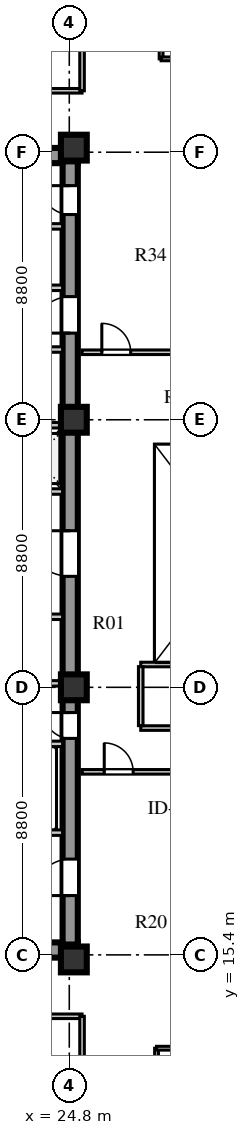
"""IFC4 building model, lengths in metres.
Left out: names, types, materials, properties, quantities, classifications, styles, units other than length and angle.
Written with IfcOpenShell. Run it as: python <this file> out.ifc"""

import sys

from ifc_helpers import new_model, si_unit, direction, frame, frame_2d, origin, origin_2d, place, context, subcontext, project, spatial, rectangle, extrude, element, fill, save


model = new_model("IFC4")
c1 = context("Model", 3, precision=1e-05, world=origin(), true_north=direction((0.0, 1.0)))
c2 = subcontext(c1, "Body", "Model", "MODEL_VIEW")
j1 = project(units=[si_unit("LENGTHUNIT", "METRE"), si_unit("PLANEANGLEUNIT", "RADIAN")], contexts=[c1])
p1 = place(None, origin())
s1 = spatial("IfcSite", under=j1, at=p1, CompositionType="ELEMENT")
p2 = place(p1, origin())
s2 = spatial("IfcBuilding", under=s1, at=p2, CompositionType="ELEMENT")
p3 = place(p2, frame((0.0, 0.0, 134.8)))
s3 = spatial("IfcBuildingStorey", under=s2, at=p3, CompositionType="ELEMENT", Elevation=134.8)
for number, where, z_axis, x_axis in (
    (1, (15.4, 15.56, 0.0), (0.0, 0.0, 1.0), (1.0, 0.0, 0.0)),
    (2, (15.4, 41.69, 0.0), (0.0, 0.0, 1.0), (1.0, 0.0, 0.0)),
):
    element("IfcWall", number, at=place(p3, frame(where, z_axis=z_axis, x_axis=x_axis)), inside=s3, PredefinedType="SHEAR", context=c2, shape_type="SweptSolid", body=[
        extrude(rectangle(XDim=9.68, YDim=0.5, at=frame_2d((4.84, 0.0))), origin(), (0.0, 0.0, 1.0), 3.6),
    ])
p4 = place(p3, frame((24.83, 15.74, 0.0), z_axis=(0.0, 0.0, 1.0), x_axis=(0.0, 1.0, 0.0)))
e3 = element("IfcWall", 3, at=p4, inside=s3, PredefinedType="SHEAR", context=c2, shape_type="SweptSolid", body=[
    extrude(rectangle(XDim=25.76, YDim=0.5, at=frame_2d((12.88, 0.0))), origin(), (0.0, 0.0, 1.0), 3.6),
])
p5 = place(p4, frame((1.61, 0.0, 0.0)))
e4 = element("IfcOpeningElement", 4, at=p5, cuts=e3, PredefinedType="OPENING", context=c2, shape_type="SweptSolid", body=[
    extrude(rectangle(XDim=1.2, YDim=2.1, at=frame_2d((0.6, 1.05))), frame((0.0, 0.26, 0.0), z_axis=(0.0, -1.0, 0.0), x_axis=(1.0, 0.0, 0.0)), (0.0, 0.0, 1.0), 0.52),
])
p6 = place(p4, frame((6.78, 0.0, 0.0)))
e5 = element("IfcOpeningElement", 5, at=p6, cuts=e3, PredefinedType="OPENING", context=c2, shape_type="SweptSolid", body=[
    extrude(rectangle(XDim=0.85, YDim=2.06, at=frame_2d((0.425, 1.03))), frame((0.0, 0.26, 0.0), z_axis=(0.0, -1.0, 0.0), x_axis=(1.0, 0.0, 0.0)), (0.0, 0.0, 1.0), 0.52),
])
p7 = place(p4, frame((12.11, 0.0, 0.0)))
e6 = element("IfcOpeningElement", 6, at=p7, cuts=e3, PredefinedType="OPENING", context=c2, shape_type="SweptSolid", body=[
    extrude(rectangle(XDim=1.5, YDim=2.12, at=frame_2d((0.75, 1.06))), frame((0.0, 0.26, 0.0), z_axis=(0.0, -1.0, 0.0), x_axis=(1.0, 0.0, 0.0)), (0.0, 0.0, 1.0), 0.52),
])
p8 = place(p4, frame((20.11, 0.0, 0.0)))
e7 = element("IfcOpeningElement", 7, at=p8, cuts=e3, PredefinedType="OPENING", context=c2, shape_type="SweptSolid", body=[
    extrude(rectangle(XDim=1.2, YDim=2.12, at=frame_2d((0.6, 1.06))), frame((0.0, 0.26, 0.0), z_axis=(0.0, -1.0, 0.0), x_axis=(1.0, 0.0, 0.0)), (0.0, 0.0, 1.0), 0.52),
])
p9 = place(p4, frame((24.01, 0.0, 0.0)))
e8 = element("IfcOpeningElement", 8, at=p9, cuts=e3, PredefinedType="OPENING", context=c2, shape_type="SweptSolid", body=[
    extrude(rectangle(XDim=0.95, YDim=2.1, at=frame_2d((0.475, 1.05))), frame((0.0, 0.26, 0.0), z_axis=(0.0, -1.0, 0.0), x_axis=(1.0, 0.0, 0.0)), (0.0, 0.0, 1.0), 0.52),
])
for number, where, z_axis, x_axis in (
    (9, (24.95, 15.25, 0.0), (0.0, 0.0, 1.0), (1.0, 0.0, 0.0)),
    (10, (24.95, 24.2, 0.0), (0.0, 0.0, 1.0), (1.0, 0.0, 0.0)),
    (11, (24.95, 33.0, 0.0), (0.0, 0.0, 1.0), (1.0, 0.0, 0.0)),
    (12, (24.95, 41.95, 0.0), (0.0, 0.0, 1.0), (1.0, 0.0, 0.0)),
):
    element("IfcColumn", number, at=place(p3, frame(where, z_axis=z_axis, x_axis=x_axis)), inside=s3, PredefinedType="COLUMN", context=c2, shape_type="SweptSolid", body=[
        extrude(rectangle(XDim=0.85, YDim=0.85, at=origin_2d()), origin(), (0.0, 0.0, 1.0), 3.6),
    ])
p10 = place(p3, frame((19.64, 19.42, 0.0), z_axis=(0.0, 0.0, 1.0), x_axis=(1.0, 0.0, 0.0)))
e13 = element("IfcWall", 13, at=p10, inside=s3, PredefinedType="SOLIDWALL", context=c2, shape_type="SweptSolid", body=[
    extrude(rectangle(XDim=4.94, YDim=0.18, at=frame_2d((2.47, 0.0))), origin(), (0.0, 0.0, 1.0), 3.6),
])
p11 = place(p10, frame((0.72, 0.0, 0.0)))
e14 = element("IfcOpeningElement", 14, at=p11, cuts=e13, PredefinedType="OPENING", context=c2, shape_type="SweptSolid", body=[
    extrude(rectangle(XDim=1.1, YDim=2.1, at=frame_2d((0.55, 1.05))), frame((0.0, 0.1, 0.0), z_axis=(0.0, -1.0, 0.0), x_axis=(1.0, 0.0, 0.0)), (0.0, 0.0, 1.0), 0.2),
])
p12 = place(p10, frame((3.02, 0.0, 0.0)))
e15 = element("IfcOpeningElement", 15, at=p12, cuts=e13, PredefinedType="OPENING", context=c2, shape_type="SweptSolid", body=[
    extrude(rectangle(XDim=1.1, YDim=2.1, at=frame_2d((0.55, 1.05))), frame((0.0, 0.1, 0.0), z_axis=(0.0, -1.0, 0.0), x_axis=(1.0, 0.0, 0.0)), (0.0, 0.0, 1.0), 0.2),
])
p13 = place(p3, frame((19.64, 22.34, 0.0), z_axis=(0.0, 0.0, 1.0), x_axis=(1.0, 0.0, 0.0)))
e16 = element("IfcWall", 16, at=p13, inside=s3, PredefinedType="SOLIDWALL", context=c2, shape_type="SweptSolid", body=[
    extrude(rectangle(XDim=4.94, YDim=0.18, at=frame_2d((2.47, 0.0))), origin(), (0.0, 0.0, 1.0), 3.6),
])
p14 = place(p3, frame((15.9, 26.52, 0.0), z_axis=(0.0, 0.0, 1.0), x_axis=(1.0, 0.0, 0.0)))
e17 = element("IfcWall", 17, at=p14, inside=s3, PredefinedType="SOLIDWALL", context=c2, shape_type="SweptSolid", body=[
    extrude(rectangle(XDim=8.68, YDim=0.18, at=frame_2d((4.34, 0.0))), origin(), (0.0, 0.0, 1.0), 3.6),
])
p15 = place(p14, frame((2.05, 0.0, 0.0)))
e18 = element("IfcOpeningElement", 18, at=p15, cuts=e17, PredefinedType="OPENING", context=c2, shape_type="SweptSolid", body=[
    extrude(rectangle(XDim=0.85, YDim=2.06, at=frame_2d((0.425, 1.03))), frame((0.0, 0.1, 0.0), z_axis=(0.0, -1.0, 0.0), x_axis=(1.0, 0.0, 0.0)), (0.0, 0.0, 1.0), 0.2),
])
p16 = place(p14, frame((5.2, 0.0, 0.0)))
e19 = element("IfcOpeningElement", 19, at=p16, cuts=e17, PredefinedType="OPENING", context=c2, shape_type="SweptSolid", body=[
    extrude(rectangle(XDim=0.95, YDim=2.1, at=frame_2d((0.475, 1.05))), frame((0.0, 0.1, 0.0), z_axis=(0.0, -1.0, 0.0), x_axis=(1.0, 0.0, 0.0)), (0.0, 0.0, 1.0), 0.2),
])
p17 = place(p3, frame((15.9, 24.33, 0.0), z_axis=(0.0, 0.0, 1.0), x_axis=(1.0, 0.0, 0.0)))
e20 = element("IfcWall", 20, at=p17, inside=s3, PredefinedType="SOLIDWALL", context=c2, shape_type="SweptSolid", body=[
    extrude(rectangle(XDim=8.68, YDim=0.18, at=frame_2d((4.34, 0.0))), origin(), (0.0, 0.0, 1.0), 2.95),
])
p18 = place(p3, frame((15.9, 30.64, 0.0), z_axis=(0.0, 0.0, 1.0), x_axis=(1.0, 0.0, 0.0)))
e21 = element("IfcWall", 21, at=p18, inside=s3, PredefinedType="SOLIDWALL", context=c2, shape_type="SweptSolid", body=[
    extrude(rectangle(XDim=8.68, YDim=0.18, at=frame_2d((4.34, 0.0))), origin(), (0.0, 0.0, 1.0), 3.6),
])
p19 = place(p18, frame((1.76, 0.0, 0.0)))
e22 = element("IfcOpeningElement", 22, at=p19, cuts=e21, PredefinedType="OPENING", context=c2, shape_type="SweptSolid", body=[
    extrude(rectangle(XDim=1.0, YDim=2.1, at=frame_2d((0.5, 1.05))), frame((0.0, 0.1, 0.0), z_axis=(0.0, -1.0, 0.0), x_axis=(1.0, 0.0, 0.0)), (0.0, 0.0, 1.0), 0.2),
])
p20 = place(p18, frame((3.6, 0.0, 0.0)))
e23 = element("IfcOpeningElement", 23, at=p20, cuts=e21, PredefinedType="OPENING", context=c2, shape_type="SweptSolid", body=[
    extrude(rectangle(XDim=1.0, YDim=2.1, at=frame_2d((0.5, 1.05))), frame((0.0, 0.1, 0.0), z_axis=(0.0, -1.0, 0.0), x_axis=(1.0, 0.0, 0.0)), (0.0, 0.0, 1.0), 0.2),
])
p21 = place(p18, frame((5.44, 0.0, 0.0)))
e24 = element("IfcOpeningElement", 24, at=p21, cuts=e21, PredefinedType="OPENING", context=c2, shape_type="SweptSolid", body=[
    extrude(rectangle(XDim=1.0, YDim=2.1, at=frame_2d((0.5, 1.05))), frame((0.0, 0.1, 0.0), z_axis=(0.0, -1.0, 0.0), x_axis=(1.0, 0.0, 0.0)), (0.0, 0.0, 1.0), 0.2),
])
p22 = place(p18, frame((7.28, 0.0, 0.0)))
e25 = element("IfcOpeningElement", 25, at=p22, cuts=e21, PredefinedType="OPENING", context=c2, shape_type="SweptSolid", body=[
    extrude(rectangle(XDim=1.0, YDim=2.1, at=frame_2d((0.5, 1.05))), frame((0.0, 0.1, 0.0), z_axis=(0.0, -1.0, 0.0), x_axis=(1.0, 0.0, 0.0)), (0.0, 0.0, 1.0), 0.2),
])
p23 = place(p3, frame((15.9, 32.82, 0.0), z_axis=(0.0, 0.0, 1.0), x_axis=(1.0, 0.0, 0.0)))
e26 = element("IfcWall", 26, at=p23, inside=s3, PredefinedType="SOLIDWALL", context=c2, shape_type="SweptSolid", body=[
    extrude(rectangle(XDim=8.68, YDim=0.18, at=frame_2d((4.34, 0.0))), origin(), (0.0, 0.0, 1.0), 2.95),
])
p24 = place(p3, frame((22.02, 35.31, 0.0), z_axis=(0.0, 0.0, 1.0), x_axis=(1.0, 0.0, 0.0)))
e27 = element("IfcWall", 27, at=p24, inside=s3, PredefinedType="SOLIDWALL", context=c2, shape_type="SweptSolid", body=[
    extrude(rectangle(XDim=2.56, YDim=0.18, at=frame_2d((1.28, 0.0))), origin(), (0.0, 0.0, 1.0), 3.6),
])
p25 = place(p24, frame((0.55, 0.0, 0.0)))
e28 = element("IfcOpeningElement", 28, at=p25, cuts=e27, PredefinedType="OPENING", context=c2, shape_type="SweptSolid", body=[
    extrude(rectangle(XDim=1.0, YDim=2.1, at=frame_2d((0.5, 1.05))), frame((0.0, 0.1, 0.0), z_axis=(0.0, -1.0, 0.0), x_axis=(1.0, 0.0, 0.0)), (0.0, 0.0, 1.0), 0.2),
])
p26 = place(p3, frame((19.64, 37.34, 0.0), z_axis=(0.0, 0.0, 1.0), x_axis=(1.0, 0.0, 0.0)))
e29 = element("IfcWall", 29, at=p26, inside=s3, PredefinedType="SOLIDWALL", context=c2, shape_type="SweptSolid", body=[
    extrude(rectangle(XDim=4.94, YDim=0.18, at=frame_2d((2.47, 0.0))), origin(), (0.0, 0.0, 1.0), 3.6),
])
p27 = place(p26, frame((0.45, 0.0, 0.0)))
e30 = element("IfcOpeningElement", 30, at=p27, cuts=e29, PredefinedType="OPENING", context=c2, shape_type="SweptSolid", body=[
    extrude(rectangle(XDim=1.0, YDim=2.1, at=frame_2d((0.5, 1.05))), frame((0.0, 0.1, 0.0), z_axis=(0.0, -1.0, 0.0), x_axis=(1.0, 0.0, 0.0)), (0.0, 0.0, 1.0), 0.2),
])
p28 = place(p26, frame((2.5, 0.0, 0.0)))
e31 = element("IfcOpeningElement", 31, at=p28, cuts=e29, PredefinedType="OPENING", context=c2, shape_type="SweptSolid", body=[
    extrude(rectangle(XDim=1.0, YDim=2.1, at=frame_2d((0.5, 1.05))), frame((0.0, 0.1, 0.0), z_axis=(0.0, -1.0, 0.0), x_axis=(1.0, 0.0, 0.0)), (0.0, 0.0, 1.0), 0.2),
])
p29 = place(p3, frame((19.64, 39.36, 0.0), z_axis=(0.0, 0.0, 1.0), x_axis=(1.0, 0.0, 0.0)))
e32 = element("IfcWall", 32, at=p29, inside=s3, PredefinedType="SOLIDWALL", context=c2, shape_type="SweptSolid", body=[
    extrude(rectangle(XDim=4.94, YDim=0.18, at=frame_2d((2.47, 0.0))), origin(), (0.0, 0.0, 1.0), 3.6),
])
p30 = place(p3, frame((25.22, 21.42, 0.0), z_axis=(0.0, 0.0, 1.0), x_axis=(1.0, 0.0, 0.0)))
e33 = element("IfcWall", 33, at=p30, inside=s3, PredefinedType="PARTITIONING", context=c2, shape_type="SweptSolid", body=[
    extrude(rectangle(XDim=15.6, YDim=0.15, at=frame_2d((7.8, 0.0))), origin(), (0.0, 0.0, 1.0), 3.2),
])
p31 = place(p30, frame((0.73, 0.0, 0.0)))
e34 = element("IfcOpeningElement", 34, at=p31, cuts=e33, PredefinedType="OPENING", context=c2, shape_type="SweptSolid", body=[
    extrude(rectangle(XDim=0.95, YDim=2.1, at=frame_2d((0.475, 1.05))), frame((0.0, 0.085, 0.0), z_axis=(0.0, -1.0, 0.0), x_axis=(1.0, 0.0, 0.0)), (0.0, 0.0, 1.0), 0.17),
])
p32 = place(p30, frame((5.23, 0.0, 0.0)))
e35 = element("IfcOpeningElement", 35, at=p32, cuts=e33, PredefinedType="OPENING", context=c2, shape_type="SweptSolid", body=[
    extrude(rectangle(XDim=0.95, YDim=2.1, at=frame_2d((0.475, 1.05))), frame((0.0, 0.085, 0.0), z_axis=(0.0, -1.0, 0.0), x_axis=(1.0, 0.0, 0.0)), (0.0, 0.0, 1.0), 0.17),
])
p33 = place(p30, frame((10.83, 0.0, 0.0)))
e36 = element("IfcOpeningElement", 36, at=p33, cuts=e33, PredefinedType="OPENING", context=c2, shape_type="SweptSolid", body=[
    extrude(rectangle(XDim=0.95, YDim=2.1, at=frame_2d((0.475, 1.05))), frame((0.0, 0.085, 0.0), z_axis=(0.0, -1.0, 0.0), x_axis=(1.0, 0.0, 0.0)), (0.0, 0.0, 1.0), 0.17),
])
p34 = place(p3, frame((27.15, 22.86, 0.0), z_axis=(0.0, 0.0, 1.0), x_axis=(1.0, 0.0, 0.0)))
e37 = element("IfcWall", 37, at=p34, inside=s3, PredefinedType="PARTITIONING", context=c2, shape_type="SweptSolid", body=[
    extrude(rectangle(XDim=13.67, YDim=0.15, at=frame_2d((6.835, 0.0))), origin(), (0.0, 0.0, 1.0), 3.6),
])
p35 = place(p34, frame((2.2, 0.0, 0.0)))
e38 = element("IfcOpeningElement", 38, at=p35, cuts=e37, PredefinedType="OPENING", context=c2, shape_type="SweptSolid", body=[
    extrude(rectangle(XDim=0.9, YDim=2.08, at=frame_2d((0.45, 1.04))), frame((0.0, 0.085, 0.0), z_axis=(0.0, -1.0, 0.0), x_axis=(1.0, 0.0, 0.0)), (0.0, 0.0, 1.0), 0.17),
])
p36 = place(p3, frame((25.22, 35.22, 0.0), z_axis=(0.0, 0.0, 1.0), x_axis=(1.0, 0.0, 0.0)))
e39 = element("IfcWall", 39, at=p36, inside=s3, PredefinedType="PARTITIONING", context=c2, shape_type="SweptSolid", body=[
    extrude(rectangle(XDim=9.5, YDim=0.15, at=frame_2d((4.75, 0.0))), origin(), (0.0, 0.0, 1.0), 3.6),
])
p37 = place(p36, frame((0.65, 0.0, 0.0)))
e40 = element("IfcOpeningElement", 40, at=p37, cuts=e39, PredefinedType="OPENING", context=c2, shape_type="SweptSolid", body=[
    extrude(rectangle(XDim=0.95, YDim=2.1, at=frame_2d((0.475, 1.05))), frame((0.0, 0.085, 0.0), z_axis=(0.0, -1.0, 0.0), x_axis=(1.0, 0.0, 0.0)), (0.0, 0.0, 1.0), 0.17),
])
p38 = place(p36, frame((5.2, 0.0, 0.0)))
e41 = element("IfcOpeningElement", 41, at=p38, cuts=e39, PredefinedType="OPENING", context=c2, shape_type="SweptSolid", body=[
    extrude(rectangle(XDim=0.95, YDim=2.1, at=frame_2d((0.475, 1.05))), frame((0.0, 0.085, 0.0), z_axis=(0.0, -1.0, 0.0), x_axis=(1.0, 0.0, 0.0)), (0.0, 0.0, 1.0), 0.17),
])
p39 = place(p3, frame((13.59, 13.38, 0.0), z_axis=(0.0, 0.0, 1.0), x_axis=(1.0, 0.0, 0.0)))
e42 = element("IfcWall", 42, at=p39, inside=s3, PredefinedType="PARTITIONING", context=c2, shape_type="SweptSolid", body=[
    extrude(rectangle(XDim=11.63, YDim=0.15, at=frame_2d((5.815, 0.0))), origin(), (0.0, 0.0, 1.0), 3.6),
])
p40 = place(p39, frame((4.56, 0.0, 0.0)))
e43 = element("IfcOpeningElement", 43, at=p40, cuts=e42, PredefinedType="OPENING", context=c2, shape_type="SweptSolid", body=[
    extrude(rectangle(XDim=1.0, YDim=2.08, at=frame_2d((0.5, 1.04))), frame((0.0, 0.085, 0.0), z_axis=(0.0, -1.0, 0.0), x_axis=(1.0, 0.0, 0.0)), (0.0, 0.0, 1.0), 0.17),
])
p41 = place(p3, frame((25.22, 10.28, 0.0), z_axis=(0.0, 0.0, 1.0), x_axis=(0.0, 1.0, 0.0)))
e44 = element("IfcWall", 44, at=p41, inside=s3, PredefinedType="PARTITIONING", context=c2, shape_type="SweptSolid", body=[
    extrude(rectangle(XDim=3.1, YDim=0.15, at=frame_2d((1.55, 0.0))), origin(), (0.0, 0.0, 1.0), 3.1),
])
p42 = place(p3, frame((13.59, 43.82, 0.0), z_axis=(0.0, 0.0, 1.0), x_axis=(1.0, 0.0, 0.0)))
e45 = element("IfcWall", 45, at=p42, inside=s3, PredefinedType="PARTITIONING", context=c2, shape_type="SweptSolid", body=[
    extrude(rectangle(XDim=11.63, YDim=0.15, at=frame_2d((5.815, 0.0))), origin(), (0.0, 0.0, 1.0), 3.6),
])
p43 = place(p42, frame((4.56, 0.0, 0.0)))
e46 = element("IfcOpeningElement", 46, at=p43, cuts=e45, PredefinedType="OPENING", context=c2, shape_type="SweptSolid", body=[
    extrude(rectangle(XDim=1.0, YDim=2.08, at=frame_2d((0.5, 1.04))), frame((0.0, 0.085, 0.0), z_axis=(0.0, -1.0, 0.0), x_axis=(1.0, 0.0, 0.0)), (0.0, 0.0, 1.0), 0.17),
])
p44 = place(p3, frame((25.22, 43.82, 0.0), z_axis=(0.0, 0.0, 1.0), x_axis=(0.0, 1.0, 0.0)))
e47 = element("IfcWall", 47, at=p44, inside=s3, PredefinedType="PARTITIONING", context=c2, shape_type="SweptSolid", body=[
    extrude(rectangle(XDim=3.1, YDim=0.15, at=frame_2d((1.55, 0.0))), origin(), (0.0, 0.0, 1.0), 3.1),
])
p45 = place(p3, frame((27.15, 24.95, 0.0), z_axis=(0.0, 0.0, 1.0), x_axis=(1.0, 0.0, 0.0)))
e48 = element("IfcWall", 48, at=p45, inside=s3, PredefinedType="PARTITIONING", context=c2, shape_type="SweptSolid", body=[
    extrude(rectangle(XDim=9.67, YDim=0.15, at=frame_2d((4.835, 0.0))), origin(), (0.0, 0.0, 1.0), 3.05),
])
p46 = place(p3, frame((27.15, 22.94, 0.0), z_axis=(0.0, 0.0, 1.0), x_axis=(0.0, 1.0, 0.0)))
e49 = element("IfcWall", 49, at=p46, inside=s3, PredefinedType="PARTITIONING", context=c2, shape_type="SweptSolid", body=[
    extrude(rectangle(XDim=1.94, YDim=0.15, at=frame_2d((0.97, 0.0))), origin(), (0.0, 0.0, 1.0), 3.6),
])
p47 = place(p3, frame((27.67, 10.28, 0.0), z_axis=(0.0, 0.0, 1.0), x_axis=(0.0, 1.0, 0.0)))
e50 = element("IfcWall", 50, at=p47, inside=s3, PredefinedType="PLUMBINGWALL", context=c2, shape_type="SweptSolid", body=[
    extrude(rectangle(XDim=2.05, YDim=0.125, at=frame_2d((1.025, 0.0))), origin(), (0.0, 0.0, 1.0), 3.6),
])
p48 = place(p3, frame((27.67, 12.33, 0.0), z_axis=(0.0, 0.0, 1.0), x_axis=(1.0, 0.0, 0.0)))
e51 = element("IfcWall", 51, at=p48, inside=s3, PredefinedType="PLUMBINGWALL", context=c2, shape_type="SweptSolid", body=[
    extrude(rectangle(XDim=2.05, YDim=0.125, at=frame_2d((1.025, 0.0))), origin(), (0.0, 0.0, 1.0), 3.6),
])
p49 = place(p48, frame((0.55, 0.0, 0.0)))
e52 = element("IfcOpeningElement", 52, at=p49, cuts=e51, PredefinedType="OPENING", context=c2, shape_type="SweptSolid", body=[
    extrude(rectangle(XDim=0.8, YDim=2.05, at=frame_2d((0.4, 1.025))), frame((0.0, 0.073, 0.0), z_axis=(0.0, -1.0, 0.0), x_axis=(1.0, 0.0, 0.0)), (0.0, 0.0, 1.0), 0.145),
])
p50 = place(p3, frame((27.82, 44.87, 0.0), z_axis=(0.0, 0.0, 1.0), x_axis=(0.0, 1.0, 0.0)))
e53 = element("IfcWall", 53, at=p50, inside=s3, PredefinedType="PLUMBINGWALL", context=c2, shape_type="SweptSolid", body=[
    extrude(rectangle(XDim=2.05, YDim=0.125, at=frame_2d((1.025, 0.0))), origin(), (0.0, 0.0, 1.0), 3.6),
])
p51 = place(p3, frame((27.82, 44.87, 0.0), z_axis=(0.0, 0.0, 1.0), x_axis=(1.0, 0.0, 0.0)))
e54 = element("IfcWall", 54, at=p51, inside=s3, PredefinedType="PLUMBINGWALL", context=c2, shape_type="SweptSolid", body=[
    extrude(rectangle(XDim=2.05, YDim=0.125, at=frame_2d((1.025, 0.0))), origin(), (0.0, 0.0, 1.0), 3.6),
])
p52 = place(p51, frame((0.55, 0.0, 0.0)))
e55 = element("IfcOpeningElement", 55, at=p52, cuts=e54, PredefinedType="OPENING", context=c2, shape_type="SweptSolid", body=[
    extrude(rectangle(XDim=0.8, YDim=2.05, at=frame_2d((0.4, 1.025))), frame((0.0, 0.073, 0.0), z_axis=(0.0, -1.0, 0.0), x_axis=(1.0, 0.0, 0.0)), (0.0, 0.0, 1.0), 0.145),
])
p53 = place(p5, frame((1.2, 0.0, 0.0), z_axis=(0.0, 0.0, 1.0), x_axis=(-1.0, 0.0, 0.0)))
e56 = element("IfcDoor", 56, at=p53, inside=s3, OperationType="SINGLE_SWING_RIGHT", PredefinedType="DOOR", context=c2, shape_type="SweptSolid", body=[
    extrude(rectangle(XDim=1.2, YDim=2.1, at=frame_2d((0.6, 1.05))), frame((0.0, 0.025, 0.0), z_axis=(0.0, -1.0, 0.0), x_axis=(1.0, 0.0, 0.0)), (0.0, 0.0, 1.0), 0.05),
])
fill(e4, e56)
p54 = place(p6, frame((0.85, 0.0, 0.0), z_axis=(0.0, 0.0, 1.0), x_axis=(-1.0, 0.0, 0.0)))
e57 = element("IfcDoor", 57, at=p54, inside=s3, OperationType="SINGLE_SWING_LEFT", PredefinedType="DOOR", context=c2, shape_type="SweptSolid", body=[
    extrude(rectangle(XDim=0.85, YDim=2.06, at=frame_2d((0.425, 1.03))), frame((0.0, 0.025, 0.0), z_axis=(0.0, -1.0, 0.0), x_axis=(1.0, 0.0, 0.0)), (0.0, 0.0, 1.0), 0.05),
])
fill(e5, e57)
p55 = place(p7, frame((1.5, 0.0, 0.0), z_axis=(0.0, 0.0, 1.0), x_axis=(-1.0, 0.0, 0.0)))
e58 = element("IfcDoor", 58, at=p55, inside=s3, OperationType="SINGLE_SWING_LEFT", PredefinedType="DOOR", context=c2, shape_type="SweptSolid", body=[
    extrude(rectangle(XDim=1.5, YDim=2.12, at=frame_2d((0.75, 1.06))), frame((0.0, 0.025, 0.0), z_axis=(0.0, -1.0, 0.0), x_axis=(1.0, 0.0, 0.0)), (0.0, 0.0, 1.0), 0.05),
])
fill(e6, e58)
p56 = place(p8, frame((1.2, 0.0, 0.0), z_axis=(0.0, 0.0, 1.0), x_axis=(-1.0, 0.0, 0.0)))
e59 = element("IfcDoor", 59, at=p56, inside=s3, OperationType="SINGLE_SWING_RIGHT", PredefinedType="DOOR", context=c2, shape_type="SweptSolid", body=[
    extrude(rectangle(XDim=1.2, YDim=2.12, at=frame_2d((0.6, 1.06))), frame((0.0, 0.025, 0.0), z_axis=(0.0, -1.0, 0.0), x_axis=(1.0, 0.0, 0.0)), (0.0, 0.0, 1.0), 0.05),
])
fill(e7, e59)
p57 = place(p9, frame((0.95, 0.0, 0.0), z_axis=(0.0, 0.0, 1.0), x_axis=(-1.0, 0.0, 0.0)))
e60 = element("IfcDoor", 60, at=p57, inside=s3, OperationType="SINGLE_SWING_LEFT", PredefinedType="DOOR", context=c2, shape_type="SweptSolid", body=[
    extrude(rectangle(XDim=0.95, YDim=2.1, at=frame_2d((0.475, 1.05))), frame((0.0, 0.025, 0.0), z_axis=(0.0, -1.0, 0.0), x_axis=(1.0, 0.0, 0.0)), (0.0, 0.0, 1.0), 0.05),
])
fill(e8, e60)
p58 = place(p31, frame((0.95, 0.0, 0.0), z_axis=(0.0, 0.0, 1.0), x_axis=(-1.0, 0.0, 0.0)))
e61 = element("IfcDoor", 61, at=p58, inside=s3, OperationType="SINGLE_SWING_RIGHT", PredefinedType="DOOR", context=c2, shape_type="SweptSolid", body=[
    extrude(rectangle(XDim=0.95, YDim=2.1, at=frame_2d((0.475, 1.05))), frame((0.0, 0.025, 0.0), z_axis=(0.0, -1.0, 0.0), x_axis=(1.0, 0.0, 0.0)), (0.0, 0.0, 1.0), 0.05),
])
fill(e34, e61)
p59 = place(p37, origin())
e62 = element("IfcDoor", 62, at=p59, inside=s3, OperationType="SINGLE_SWING_LEFT", PredefinedType="DOOR", context=c2, shape_type="SweptSolid", body=[
    extrude(rectangle(XDim=0.95, YDim=2.1, at=frame_2d((0.475, 1.05))), frame((0.0, 0.025, 0.0), z_axis=(0.0, -1.0, 0.0), x_axis=(1.0, 0.0, 0.0)), (0.0, 0.0, 1.0), 0.05),
])
fill(e40, e62)
save(model, sys.argv[1])
